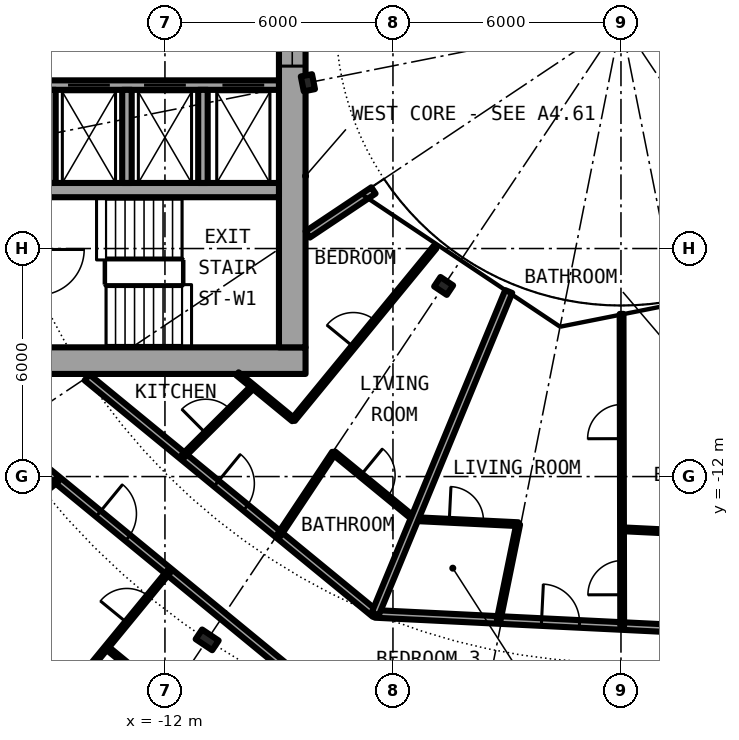
"""IFC4 building model, lengths in metres.
Left out: names, types, materials, properties, quantities, classifications, styles, units other than length and angle.
Written with IfcOpenShell. Run it as: python <this file> out.ifc"""

import sys

from ifc_helpers import new_model, si_unit, direction, frame, frame_2d, origin, origin_2d, place, context, subcontext, project, spatial, rectangle, i_section, extrude, element, fill, save


model = new_model("IFC4")
c1 = context("Model", 3, precision=1e-05, world=origin(), true_north=direction((0.0, 1.0)))
c2 = subcontext(c1, "Body", "Model", "MODEL_VIEW")
j1 = project(units=[si_unit("LENGTHUNIT", "METRE"), si_unit("PLANEANGLEUNIT", "RADIAN")], contexts=[c1])
p1 = place(None, origin())
s1 = spatial("IfcSite", under=j1, at=p1, CompositionType="ELEMENT")
p2 = place(p1, origin())
s2 = spatial("IfcBuilding", under=s1, at=p2, CompositionType="ELEMENT")
p3 = place(p2, frame((0.0, 0.0, 72.75)))
s3 = spatial("IfcBuildingStorey", under=s2, at=p3, CompositionType="ELEMENT", Elevation=72.75)
p4 = place(p3, frame((-10.889, -16.297, 0.0), z_axis=(0.0, 0.0, 1.0), x_axis=(-0.55557023302, -0.831469612303, 0.0)))
e1 = element("IfcColumn", 1, at=p4, inside=s3, PredefinedType="COLUMN", context=c2, shape_type="SweptSolid", body=[
    extrude(i_section(OverallWidth=0.306, OverallDepth=0.524, WebThickness=0.021, FlangeThickness=0.04, FilletRadius=0.027, at=origin_2d()), origin(), (0.0, 0.0, 1.0), 3.05),
])
for number, where, z_axis, x_axis in (
    (2, (-8.239, -1.639, 0.0), (0.0, 0.0, 1.0), (-0.981, -0.195, 0.0)),
    (3, (-4.667, -6.984, 0.0), (0.0, 0.0, 1.0), (-0.556, -0.831, 0.0)),
):
    element("IfcColumn", number, at=place(p3, frame(where, z_axis=z_axis, x_axis=x_axis)), inside=s3, PredefinedType="COLUMN", context=c2, shape_type="SweptSolid", body=[
        extrude(i_section(OverallWidth=0.3, OverallDepth=0.4, WebThickness=0.013, FlangeThickness=0.024, FilletRadius=0.027, at=origin_2d()), origin(), (0.0, 0.0, 1.0), 3.05),
    ])
p5 = place(p3, frame((-22.3, -8.95, 0.0), z_axis=(0.0, 0.0, 1.0), x_axis=(1.0, 0.0, 0.0)))
e4 = element("IfcWall", 4, at=p5, inside=s3, PredefinedType="SHEAR", context=c2, shape_type="SweptSolid", body=[
    extrude(rectangle(XDim=14.0, YDim=0.7, at=frame_2d((7.0, 0.0))), origin(), (0.0, 0.0, 1.0), 3.05),
])
p6 = place(p5, frame((1.225, 0.0, 0.0)))
e5 = element("IfcOpeningElement", 5, at=p6, cuts=e4, PredefinedType="OPENING", context=c2, shape_type="SweptSolid", body=[
    extrude(rectangle(XDim=1.2, YDim=2.3, at=frame_2d((0.6, 1.15))), frame((0.0, 0.36, 0.0), z_axis=(0.0, -1.0, 0.0), x_axis=(1.0, 0.0, 0.0)), (0.0, 0.0, 1.0), 0.72),
])
p7 = place(p3, frame((-8.65, 8.6, 0.0), z_axis=(0.0, 0.0, 1.0), x_axis=(0.0, -1.0, 0.0)))
e6 = element("IfcWall", 6, at=p7, inside=s3, PredefinedType="SHEAR", context=c2, shape_type="SweptSolid", body=[
    extrude(rectangle(XDim=17.2, YDim=0.7, at=frame_2d((8.6, 0.0))), origin(), (0.0, 0.0, 1.0), 3.05),
])
p8 = place(p7, frame((7.4, 0.0, 0.1)))
e7 = element("IfcOpeningElement", 7, at=p8, cuts=e6, PredefinedType="OPENING", context=c2, shape_type="SweptSolid", body=[
    extrude(rectangle(XDim=2.4, YDim=2.2, at=frame_2d((1.2, 1.1))), frame((0.0, 0.36, 0.0), z_axis=(0.0, -1.0, 0.0), x_axis=(1.0, 0.0, 0.0)), (0.0, 0.0, 1.0), 0.72),
])
p9 = place(p3, frame((-9.0, -1.7, 0.0), z_axis=(0.0, 0.0, 1.0), x_axis=(-1.0, 0.0, 0.0)))
e8 = element("IfcWall", 8, at=p9, inside=s3, PredefinedType="SHEAR", context=c2, shape_type="SweptSolid", body=[
    extrude(rectangle(XDim=10.15, YDim=0.25, at=frame_2d((5.075, 0.0))), origin(), (0.0, 0.0, 1.0), 3.05),
])
p10 = place(p9, frame((0.387, 0.0, 0.0)))
e9 = element("IfcOpeningElement", 9, at=p10, cuts=e8, PredefinedType="OPENING", context=c2, shape_type="SweptSolid", body=[
    extrude(rectangle(XDim=1.1, YDim=2.3, at=frame_2d((0.55, 1.15))), frame((0.0, 0.135, 0.0), z_axis=(0.0, -1.0, 0.0), x_axis=(1.0, 0.0, 0.0)), (0.0, 0.0, 1.0), 0.27),
])
p11 = place(p9, frame((2.45, 0.0, 0.0)))
e10 = element("IfcOpeningElement", 10, at=p11, cuts=e8, PredefinedType="OPENING", context=c2, shape_type="SweptSolid", body=[
    extrude(rectangle(XDim=1.1, YDim=2.3, at=frame_2d((0.55, 1.15))), frame((0.0, 0.135, 0.0), z_axis=(0.0, -1.0, 0.0), x_axis=(1.0, 0.0, 0.0)), (0.0, 0.0, 1.0), 0.27),
])
p12 = place(p9, frame((4.45, 0.0, 0.0)))
e11 = element("IfcOpeningElement", 11, at=p12, cuts=e8, PredefinedType="OPENING", context=c2, shape_type="SweptSolid", body=[
    extrude(rectangle(XDim=1.1, YDim=2.3, at=frame_2d((0.55, 1.15))), frame((0.0, 0.135, 0.0), z_axis=(0.0, -1.0, 0.0), x_axis=(1.0, 0.0, 0.0)), (0.0, 0.0, 1.0), 0.27),
])
p13 = place(p3, frame((-9.0, -4.462, 0.0), z_axis=(0.0, 0.0, 1.0), x_axis=(-1.0, 0.0, 0.0)))
e12 = element("IfcWall", 12, at=p13, inside=s3, PredefinedType="SHEAR", context=c2, shape_type="SweptSolid", body=[
    extrude(rectangle(XDim=10.15, YDim=0.375, at=frame_2d((5.075, 0.0))), origin(), (0.0, 0.0, 1.0), 3.05),
])
p14 = place(p13, frame((6.6, 0.0, 0.0)))
e13 = element("IfcOpeningElement", 13, at=p14, cuts=e12, PredefinedType="OPENING", context=c2, shape_type="SweptSolid", body=[
    extrude(rectangle(XDim=1.1, YDim=2.3, at=frame_2d((0.55, 1.15))), frame((0.0, 0.198, 0.0), z_axis=(0.0, -1.0, 0.0), x_axis=(1.0, 0.0, 0.0)), (0.0, 0.0, 1.0), 0.395),
])
for number, where, z_axis, x_axis in (
    (14, (-15.0, -1.825, 0.0), (0.0, 0.0, 1.0), (0.0, -1.0, 0.0)),
    (15, (-11.0, -1.825, 0.0), (0.0, 0.0, 1.0), (0.0, -1.0, 0.0)),
    (16, (-13.0, -1.825, 0.0), (0.0, 0.0, 1.0), (0.0, -1.0, 0.0)),
):
    element("IfcWall", number, at=place(p3, frame(where, z_axis=z_axis, x_axis=x_axis)), inside=s3, PredefinedType="SOLIDWALL", context=c2, shape_type="SweptSolid", body=[
        extrude(rectangle(XDim=2.45, YDim=0.25, at=frame_2d((1.225, 0.0))), origin(), (0.0, 0.0, 1.0), 2.7),
    ])
p15 = place(p3, frame((-13.538, -16.496, 0.0), z_axis=(0.0, 0.0, 1.0), x_axis=(0.773000340237, -0.634405606843, 0.0)))
e17 = element("IfcWall", 17, at=p15, inside=s3, PredefinedType="PARTITIONING", context=c2, shape_type="SweptSolid", body=[
    extrude(rectangle(XDim=6.474, YDim=0.1, at=frame_2d((3.237, 0.0))), origin(), (0.0, 0.0, 1.0), 2.7),
])
p16 = place(p3, frame((-16.172, -10.99, 0.0), z_axis=(0.0, 0.0, 1.0), x_axis=(0.772669779479, -0.634808169355, 0.0)))
e18 = element("IfcWall", 18, at=p16, inside=s3, PredefinedType="PARTITIONING", context=c2, shape_type="SweptSolid", body=[
    extrude(rectangle(XDim=11.208, YDim=0.2, at=frame_2d((5.604, 0.0))), origin(), (0.0, 0.0, 1.0), 2.38),
])
p17 = place(p16, frame((3.135, 0.0, 0.0)))
e19 = element("IfcOpeningElement", 19, at=p17, cuts=e18, PredefinedType="OPENING", context=c2, shape_type="SweptSolid", body=[
    extrude(rectangle(XDim=1.0, YDim=2.3, at=frame_2d((0.5, 1.15))), frame((0.0, 0.11, 0.0), z_axis=(0.0, -1.0, 0.0), x_axis=(1.0, 0.0, 0.0)), (0.0, 0.0, 1.0), 0.22),
])
p18 = place(p3, frame((0.0, -19.6, 0.0), z_axis=(0.0, 0.0, 1.0), x_axis=(0.956932298225, 0.290311172044, 0.0)))
e20 = element("IfcWall", 20, at=p18, inside=s3, PredefinedType="PARTITIONING", context=c2, shape_type="SweptSolid", body=[
    extrude(rectangle(XDim=11.219, YDim=0.2, at=frame_2d((5.61, 0.0))), origin(), (0.0, 0.0, 1.0), 2.38),
])
p19 = place(p18, frame((7.086, 0.0, 0.0)))
e21 = element("IfcOpeningElement", 21, at=p19, cuts=e20, PredefinedType="OPENING", context=c2, shape_type="SweptSolid", body=[
    extrude(rectangle(XDim=1.0, YDim=2.3, at=frame_2d((0.5, 1.15))), frame((0.0, 0.11, 0.0), z_axis=(0.0, -1.0, 0.0), x_axis=(1.0, 0.0, 0.0)), (0.0, 0.0, 1.0), 0.22),
])
p20 = place(p3, frame((-14.05, -9.392, 0.0), z_axis=(0.0, 0.0, 1.0), x_axis=(0.773074935257, -0.634314704605, 0.0)))
e22 = element("IfcWall", 22, at=p20, inside=s3, PredefinedType="PARTITIONING", context=c2, shape_type="SweptSolid", body=[
    extrude(rectangle(XDim=9.809, YDim=0.2, at=frame_2d((4.904, 0.0))), origin(), (0.0, 0.0, 1.0), 2.7),
])
p21 = place(p20, frame((4.402, 0.0, 0.0)))
e23 = element("IfcOpeningElement", 23, at=p21, cuts=e22, PredefinedType="OPENING", context=c2, shape_type="SweptSolid", body=[
    extrude(rectangle(XDim=1.0, YDim=2.3, at=frame_2d((0.5, 1.15))), frame((0.0, 0.11, 0.0), z_axis=(0.0, -1.0, 0.0), x_axis=(1.0, 0.0, 0.0)), (0.0, 0.0, 1.0), 0.22),
])
p22 = place(p3, frame((-6.469, -15.614, 0.0), z_axis=(0.0, 0.0, 1.0), x_axis=(0.998798520108, -0.049005267363, 0.0)))
e24 = element("IfcWall", 24, at=p22, inside=s3, PredefinedType="PARTITIONING", context=c2, shape_type="SweptSolid", body=[
    extrude(rectangle(XDim=11.389, YDim=0.2, at=frame_2d((5.694, 0.0))), origin(), (0.0, 0.0, 1.0), 2.7),
])
p23 = place(p22, frame((4.383, 0.0, 0.0)))
e25 = element("IfcOpeningElement", 25, at=p23, cuts=e24, PredefinedType="OPENING", context=c2, shape_type="SweptSolid", body=[
    extrude(rectangle(XDim=1.0, YDim=2.3, at=frame_2d((0.5, 1.15))), frame((0.0, 0.11, 0.0), z_axis=(0.0, -1.0, 0.0), x_axis=(1.0, 0.0, 0.0)), (0.0, 0.0, 1.0), 0.22),
])
p24 = place(p3, frame((-10.093, -9.296, 0.0), z_axis=(0.0, 0.0, 1.0), x_axis=(0.772957368531, -0.6344579627, 0.0)))
e26 = element("IfcWall", 26, at=p24, inside=s3, PredefinedType="PARTITIONING", context=c2, shape_type="SweptSolid", body=[
    extrude(rectangle(XDim=1.906, YDim=0.1, at=frame_2d((0.953, 0.0))), origin(), (0.0, 0.0, 1.0), 2.7),
])
p25 = place(p3, frame((-7.558, -11.376, 0.0), z_axis=(0.0, 0.0, 1.0), x_axis=(0.773049907698, -0.634345205868, 0.0)))
e27 = element("IfcWall", 27, at=p25, inside=s3, PredefinedType="PARTITIONING", context=c2, shape_type="SweptSolid", body=[
    extrude(rectangle(XDim=2.748, YDim=0.1, at=frame_2d((1.374, 0.0))), origin(), (0.0, 0.0, 1.0), 2.7),
])
p26 = place(p25, frame((0.924, 0.0, 0.0)))
e28 = element("IfcOpeningElement", 28, at=p26, cuts=e27, PredefinedType="OPENING", context=c2, shape_type="SweptSolid", body=[
    extrude(rectangle(XDim=0.9, YDim=2.3, at=frame_2d((0.45, 1.15))), frame((0.0, 0.06, 0.0), z_axis=(0.0, -1.0, 0.0), x_axis=(1.0, 0.0, 0.0)), (0.0, 0.0, 1.0), 0.12),
])
p27 = place(p3, frame((-5.434, -13.119, 0.0), z_axis=(0.0, 0.0, 1.0), x_axis=(0.998796928508, -0.049037695739, 0.0)))
e29 = element("IfcWall", 29, at=p27, inside=s3, PredefinedType="PARTITIONING", context=c2, shape_type="SweptSolid", body=[
    extrude(rectangle(XDim=2.733, YDim=0.1, at=frame_2d((1.367, 0.0))), origin(), (0.0, 0.0, 1.0), 2.7),
])
p28 = place(p27, frame((0.917, 0.0, 0.0)))
e30 = element("IfcOpeningElement", 30, at=p28, cuts=e29, PredefinedType="OPENING", context=c2, shape_type="SweptSolid", body=[
    extrude(rectangle(XDim=0.9, YDim=2.3, at=frame_2d((0.45, 1.15))), frame((0.0, 0.06, 0.0), z_axis=(0.0, -1.0, 0.0), x_axis=(1.0, 0.0, 0.0)), (0.0, 0.0, 1.0), 0.12),
])
p29 = place(p3, frame((0.03, -13.387, 0.0), z_axis=(0.0, 0.0, 1.0), x_axis=(0.998798386358, -0.049007993321, 0.0)))
e31 = element("IfcWall", 31, at=p29, inside=s3, PredefinedType="PARTITIONING", context=c2, shape_type="SweptSolid", body=[
    extrude(rectangle(XDim=4.1, YDim=0.1, at=frame_2d((2.05, 0.0))), origin(), (0.0, 0.0, 1.0), 2.7),
])
p30 = place(p3, frame((-6.513, -4.472, 0.0), z_axis=(0.0, 0.0, 1.0), x_axis=(-0.831382204863, -0.555701025225, 0.0)))
e32 = element("IfcWall", 32, at=p30, inside=s3, PredefinedType="PARTITIONING", context=c2, shape_type="SweptSolid", body=[
    extrude(rectangle(XDim=2.082, YDim=0.2, at=frame_2d((1.041, 0.0))), origin(), (0.0, 0.0, 1.0), 2.7),
])
p31 = place(p3, frame((-17.24, -21.007, 0.0), z_axis=(0.0, 0.0, 1.0), x_axis=(0.634396151441, 0.77300810024, 0.0)))
e33 = element("IfcWall", 33, at=p31, inside=s3, PredefinedType="PARTITIONING", context=c2, shape_type="SweptSolid", body=[
    extrude(rectangle(XDim=8.419, YDim=0.1, at=frame_2d((4.209, 0.0))), origin(), (0.0, 0.0, 1.0), 2.7),
])
p32 = place(p31, frame((6.679, 0.0, 0.0)))
e34 = element("IfcOpeningElement", 34, at=p32, cuts=e33, PredefinedType="OPENING", context=c2, shape_type="SweptSolid", body=[
    extrude(rectangle(XDim=0.9, YDim=2.3, at=frame_2d((0.45, 1.15))), frame((0.0, 0.06, 0.0), z_axis=(0.0, -1.0, 0.0), x_axis=(1.0, 0.0, 0.0)), (0.0, 0.0, 1.0), 0.12),
])
p33 = place(p31, frame((2.468, 0.0, 0.0)))
e35 = element("IfcOpeningElement", 35, at=p33, cuts=e33, PredefinedType="OPENING", context=c2, shape_type="SweptSolid", body=[
    extrude(rectangle(XDim=0.9, YDim=2.3, at=frame_2d((0.45, 1.15))), frame((0.0, 0.06, 0.0), z_axis=(0.0, -1.0, 0.0), x_axis=(1.0, 0.0, 0.0)), (0.0, 0.0, 1.0), 0.12),
])
p34 = place(p3, frame((-16.874, -13.758, 0.0), z_axis=(0.0, 0.0, 1.0), x_axis=(0.774979608522, 0.631986239072, 0.0)))
e36 = element("IfcWall", 36, at=p34, inside=s3, PredefinedType="PARTITIONING", context=c2, shape_type="SweptSolid", body=[
    extrude(rectangle(XDim=2.636, YDim=0.1, at=frame_2d((1.318, 0.0))), origin(), (0.0, 0.0, 1.0), 2.7),
])
p35 = place(p34, frame((0.868, 0.0, 0.0)))
e37 = element("IfcOpeningElement", 37, at=p35, cuts=e36, PredefinedType="OPENING", context=c2, shape_type="SweptSolid", body=[
    extrude(rectangle(XDim=0.9, YDim=2.3, at=frame_2d((0.45, 1.15))), frame((0.0, 0.06, 0.0), z_axis=(0.0, -1.0, 0.0), x_axis=(1.0, 0.0, 0.0)), (0.0, 0.0, 1.0), 0.12),
])
p36 = place(p3, frame((-11.524, -11.464, 0.0), z_axis=(0.0, 0.0, 1.0), x_axis=(0.708796844581, 0.705412668665, 0.0)))
e38 = element("IfcWall", 38, at=p36, inside=s3, PredefinedType="PARTITIONING", context=c2, shape_type="SweptSolid", body=[
    extrude(rectangle(XDim=2.597, YDim=0.1, at=frame_2d((1.299, 0.0))), origin(), (0.0, 0.0, 1.0), 2.7),
])
p37 = place(p36, frame((0.849, 0.0, 0.0)))
e39 = element("IfcOpeningElement", 39, at=p37, cuts=e38, PredefinedType="OPENING", context=c2, shape_type="SweptSolid", body=[
    extrude(rectangle(XDim=0.9, YDim=2.3, at=frame_2d((0.45, 1.15))), frame((0.0, 0.06, 0.0), z_axis=(0.0, -1.0, 0.0), x_axis=(1.0, 0.0, 0.0)), (0.0, 0.0, 1.0), 0.12),
])
p38 = place(p3, frame((-8.996, -13.539, 0.0), z_axis=(0.0, 0.0, 1.0), x_axis=(0.553615197403, 0.83277260594, 0.0)))
e40 = element("IfcWall", 40, at=p38, inside=s3, PredefinedType="PARTITIONING", context=c2, shape_type="SweptSolid", body=[
    extrude(rectangle(XDim=2.597, YDim=0.1, at=frame_2d((1.299, 0.0))), origin(), (0.0, 0.0, 1.0), 2.7),
])
p39 = place(p3, frame((-8.62, -10.504, 0.0), z_axis=(0.0, 0.0, 1.0), x_axis=(0.634539754242, 0.772890225249, 0.0)))
e41 = element("IfcWall", 41, at=p39, inside=s3, PredefinedType="PARTITIONING", context=c2, shape_type="SweptSolid", body=[
    extrude(rectangle(XDim=5.867, YDim=0.1, at=frame_2d((2.934, 0.0))), origin(), (0.0, 0.0, 1.0), 2.7),
])
p40 = place(p39, frame((2.484, 0.0, 0.0)))
e42 = element("IfcOpeningElement", 42, at=p40, cuts=e41, PredefinedType="OPENING", context=c2, shape_type="SweptSolid", body=[
    extrude(rectangle(XDim=0.9, YDim=2.3, at=frame_2d((0.45, 1.15))), frame((0.0, 0.06, 0.0), z_axis=(0.0, -1.0, 0.0), x_axis=(1.0, 0.0, 0.0)), (0.0, 0.0, 1.0), 0.12),
])
p41 = place(p3, frame((-6.467, -15.614, 0.0), z_axis=(0.0, 0.0, 1.0), x_axis=(0.382646942224, 0.923894646378, 0.0)))
e43 = element("IfcWall", 43, at=p41, inside=s3, PredefinedType="PARTITIONING", context=c2, shape_type="SweptSolid", body=[
    extrude(rectangle(XDim=9.181, YDim=0.2, at=frame_2d((4.59, 0.0))), origin(), (0.0, 0.0, 1.0), 2.7),
])
p42 = place(p3, frame((-3.218, -15.773, 0.0), z_axis=(0.0, 0.0, 1.0), x_axis=(0.199820523641, 0.979832515449, 0.0)))
e44 = element("IfcWall", 44, at=p42, inside=s3, PredefinedType="PARTITIONING", context=c2, shape_type="SweptSolid", body=[
    extrude(rectangle(XDim=2.572, YDim=0.1, at=frame_2d((1.286, 0.0))), origin(), (0.0, 0.0, 1.0), 2.7),
])
p43 = place(p3, frame((0.032, -15.933, 0.0), z_axis=(0.0, 0.0, 1.0), x_axis=(-0.0019321625, 0.999998133372, 0.0)))
e45 = element("IfcWall", 45, at=p43, inside=s3, PredefinedType="PARTITIONING", context=c2, shape_type="SweptSolid", body=[
    extrude(rectangle(XDim=8.213, YDim=0.1, at=frame_2d((4.106, 0.0))), origin(), (0.0, 0.0, 1.0), 2.7),
])
p44 = place(p43, frame((0.823, 0.0, 0.0)))
e46 = element("IfcOpeningElement", 46, at=p44, cuts=e45, PredefinedType="OPENING", context=c2, shape_type="SweptSolid", body=[
    extrude(rectangle(XDim=0.9, YDim=2.3, at=frame_2d((0.45, 1.15))), frame((0.0, 0.06, 0.0), z_axis=(0.0, -1.0, 0.0), x_axis=(1.0, 0.0, 0.0)), (0.0, 0.0, 1.0), 0.12),
])
p45 = place(p43, frame((4.93, 0.0, 0.0)))
e47 = element("IfcOpeningElement", 47, at=p45, cuts=e45, PredefinedType="OPENING", context=c2, shape_type="SweptSolid", body=[
    extrude(rectangle(XDim=0.9, YDim=2.3, at=frame_2d((0.45, 1.15))), frame((0.0, 0.06, 0.0), z_axis=(0.0, -1.0, 0.0), x_axis=(1.0, 0.0, 0.0)), (0.0, 0.0, 1.0), 0.12),
])
p46 = place(p10, origin())
e48 = element("IfcDoor", 48, at=p46, inside=s3, OperationType="DOUBLE_DOOR_SLIDING", PredefinedType="DOOR", context=c2, shape_type="SweptSolid", body=[
    extrude(rectangle(XDim=1.1, YDim=2.3, at=frame_2d((0.55, 1.15))), frame((0.0, 0.025, 0.0), z_axis=(0.0, -1.0, 0.0), x_axis=(1.0, 0.0, 0.0)), (0.0, 0.0, 1.0), 0.05),
])
fill(e9, e48)
p47 = place(p11, origin())
e49 = element("IfcDoor", 49, at=p47, inside=s3, OperationType="DOUBLE_DOOR_SLIDING", PredefinedType="DOOR", context=c2, shape_type="SweptSolid", body=[
    extrude(rectangle(XDim=1.1, YDim=2.3, at=frame_2d((0.55, 1.15))), frame((0.0, 0.025, 0.0), z_axis=(0.0, -1.0, 0.0), x_axis=(1.0, 0.0, 0.0)), (0.0, 0.0, 1.0), 0.05),
])
fill(e10, e49)
p48 = place(p12, origin())
e50 = element("IfcDoor", 50, at=p48, inside=s3, OperationType="DOUBLE_DOOR_SLIDING", PredefinedType="DOOR", context=c2, shape_type="SweptSolid", body=[
    extrude(rectangle(XDim=1.1, YDim=2.3, at=frame_2d((0.55, 1.15))), frame((0.0, 0.025, 0.0), z_axis=(0.0, -1.0, 0.0), x_axis=(1.0, 0.0, 0.0)), (0.0, 0.0, 1.0), 0.05),
])
fill(e11, e50)
p49 = place(p8, origin())
e51 = element("IfcWindow", 51, at=p49, inside=s3, PartitioningType="SINGLE_PANEL", PredefinedType="WINDOW", context=c2, shape_type="SweptSolid", body=[
    extrude(rectangle(XDim=2.4, YDim=2.2, at=frame_2d((1.2, 1.1))), frame((0.0, 0.03, 0.0), z_axis=(0.0, -1.0, 0.0), x_axis=(1.0, 0.0, 0.0)), (0.0, 0.0, 1.0), 0.06),
])
fill(e7, e51)
p50 = place(p17, origin())
e52 = element("IfcDoor", 52, at=p50, inside=s3, OperationType="SINGLE_SWING_LEFT", PredefinedType="DOOR", context=c2, shape_type="SweptSolid", body=[
    extrude(rectangle(XDim=1.0, YDim=2.3, at=frame_2d((0.5, 1.15))), frame((0.0, 0.025, 0.0), z_axis=(0.0, -1.0, 0.0), x_axis=(1.0, 0.0, 0.0)), (0.0, 0.0, 1.0), 0.05),
])
fill(e19, e52)
p51 = place(p32, origin())
e53 = element("IfcDoor", 53, at=p51, inside=s3, OperationType="SINGLE_SWING_RIGHT", PredefinedType="DOOR", context=c2, shape_type="SweptSolid", body=[
    extrude(rectangle(XDim=0.9, YDim=2.3, at=frame_2d((0.45, 1.15))), frame((0.0, 0.025, 0.0), z_axis=(0.0, -1.0, 0.0), x_axis=(1.0, 0.0, 0.0)), (0.0, 0.0, 1.0), 0.05),
])
fill(e34, e53)
p52 = place(p21, origin())
e54 = element("IfcDoor", 54, at=p52, inside=s3, OperationType="SINGLE_SWING_LEFT", PredefinedType="DOOR", context=c2, shape_type="SweptSolid", body=[
    extrude(rectangle(XDim=1.0, YDim=2.3, at=frame_2d((0.5, 1.15))), frame((0.0, 0.025, 0.0), z_axis=(0.0, -1.0, 0.0), x_axis=(1.0, 0.0, 0.0)), (0.0, 0.0, 1.0), 0.05),
])
fill(e23, e54)
p53 = place(p26, origin())
e55 = element("IfcDoor", 55, at=p53, inside=s3, OperationType="SINGLE_SWING_LEFT", PredefinedType="DOOR", context=c2, shape_type="SweptSolid", body=[
    extrude(rectangle(XDim=0.9, YDim=2.3, at=frame_2d((0.45, 1.15))), frame((0.0, 0.025, 0.0), z_axis=(0.0, -1.0, 0.0), x_axis=(1.0, 0.0, 0.0)), (0.0, 0.0, 1.0), 0.05),
])
fill(e28, e55)
p54 = place(p37, origin())
e56 = element("IfcDoor", 56, at=p54, inside=s3, OperationType="SINGLE_SWING_RIGHT", PredefinedType="DOOR", context=c2, shape_type="SweptSolid", body=[
    extrude(rectangle(XDim=0.9, YDim=2.3, at=frame_2d((0.45, 1.15))), frame((0.0, 0.025, 0.0), z_axis=(0.0, -1.0, 0.0), x_axis=(1.0, 0.0, 0.0)), (0.0, 0.0, 1.0), 0.05),
])
fill(e39, e56)
p55 = place(p40, origin())
e57 = element("IfcDoor", 57, at=p55, inside=s3, OperationType="SINGLE_SWING_RIGHT", PredefinedType="DOOR", context=c2, shape_type="SweptSolid", body=[
    extrude(rectangle(XDim=0.9, YDim=2.3, at=frame_2d((0.45, 1.15))), frame((0.0, 0.025, 0.0), z_axis=(0.0, -1.0, 0.0), x_axis=(1.0, 0.0, 0.0)), (0.0, 0.0, 1.0), 0.05),
])
fill(e42, e57)
p56 = place(p23, origin())
e58 = element("IfcDoor", 58, at=p56, inside=s3, OperationType="SINGLE_SWING_LEFT", PredefinedType="DOOR", context=c2, shape_type="SweptSolid", body=[
    extrude(rectangle(XDim=1.0, YDim=2.3, at=frame_2d((0.5, 1.15))), frame((0.0, 0.025, 0.0), z_axis=(0.0, -1.0, 0.0), x_axis=(1.0, 0.0, 0.0)), (0.0, 0.0, 1.0), 0.05),
])
fill(e25, e58)
p57 = place(p28, origin())
e59 = element("IfcDoor", 59, at=p57, inside=s3, OperationType="SINGLE_SWING_LEFT", PredefinedType="DOOR", context=c2, shape_type="SweptSolid", body=[
    extrude(rectangle(XDim=0.9, YDim=2.3, at=frame_2d((0.45, 1.15))), frame((0.0, 0.025, 0.0), z_axis=(0.0, -1.0, 0.0), x_axis=(1.0, 0.0, 0.0)), (0.0, 0.0, 1.0), 0.05),
])
fill(e30, e59)
p58 = place(p44, origin())
e60 = element("IfcDoor", 60, at=p58, inside=s3, OperationType="SINGLE_SWING_LEFT", PredefinedType="DOOR", context=c2, shape_type="SweptSolid", body=[
    extrude(rectangle(XDim=0.9, YDim=2.3, at=frame_2d((0.45, 1.15))), frame((0.0, 0.025, 0.0), z_axis=(0.0, -1.0, 0.0), x_axis=(1.0, 0.0, 0.0)), (0.0, 0.0, 1.0), 0.05),
])
fill(e46, e60)
p59 = place(p45, origin())
e61 = element("IfcDoor", 61, at=p59, inside=s3, OperationType="SINGLE_SWING_RIGHT", PredefinedType="DOOR", context=c2, shape_type="SweptSolid", body=[
    extrude(rectangle(XDim=0.9, YDim=2.3, at=frame_2d((0.45, 1.15))), frame((0.0, 0.025, 0.0), z_axis=(0.0, -1.0, 0.0), x_axis=(1.0, 0.0, 0.0)), (0.0, 0.0, 1.0), 0.05),
])
fill(e47, e61)
save(model, sys.argv[1])
